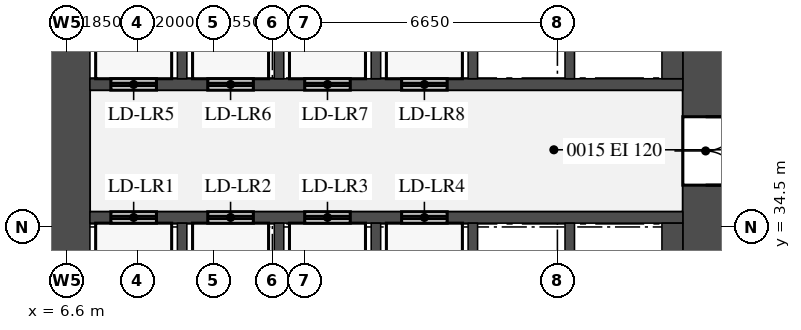
"""IFC4 building model, lengths in metres.
Left out: names, types, materials, properties, quantities, classifications, styles, units other than length and angle.
Written with IfcOpenShell. Run it as: python <this file> out.ifc"""

import sys

from ifc_helpers import new_model, si_unit, direction, frame, frame_2d, origin, place, context, subcontext, project, spatial, rectangle, extrude, source, transform, mapped, element, fill, save


model = new_model("IFC4")
c1 = context("Model", 3, precision=1e-05, world=origin(), true_north=direction((0.0, 1.0)))
c2 = subcontext(c1, "Body", "Model", "MODEL_VIEW")
j1 = project(units=[si_unit("LENGTHUNIT", "METRE"), si_unit("PLANEANGLEUNIT", "RADIAN")], contexts=[c1])
p1 = place(None, origin())
s1 = spatial("IfcSite", under=j1, at=p1, CompositionType="ELEMENT")
p2 = place(p1, origin())
s2 = spatial("IfcBuilding", under=s1, at=p2, CompositionType="ELEMENT")
p3 = place(p2, frame((0.0, 0.0, 46.5)))
s3 = spatial("IfcBuildingStorey", under=s2, at=p3, CompositionType="ELEMENT", Elevation=46.5)
m1 = source(origin(), c2, "Body", "SweptSolid", [
    extrude(rectangle(XDim=27.6, YDim=1.2, at=frame_2d((13.8, 0.0))), origin(), (0.0, 0.0, 1.0), 4.2),
])
p4 = place(p3, frame((23.4, 13.2, 0.0), z_axis=(0.0, 0.0, 1.0), x_axis=(0.0, 1.0, 0.0)))
e1 = element("IfcWall", 1, at=p4, inside=s3, PredefinedType="SHEAR", context=c2, shape_type="MappedRepresentation", body=[
    mapped(m1, transform((0.0, 0.0, 0.0))),
])
m2 = source(origin(), c2, "Body", "SweptSolid", [
    extrude(rectangle(XDim=1.8, YDim=2.1, at=frame_2d((0.9, 1.05))), frame((0.0, 0.61, 0.0), z_axis=(0.0, -1.0, 0.0), x_axis=(1.0, 0.0, 0.0)), (0.0, 0.0, 1.0), 1.22),
])
p5 = place(p4, frame((22.4, 0.0, 0.0)))
e2 = element("IfcOpeningElement", 2, at=p5, cuts=e1, PredefinedType="OPENING", context=c2, shape_type="MappedRepresentation", body=[
    mapped(m2, transform((0.0, 0.0, 0.0))),
])
m3 = source(origin(), c2, "Body", "SweptSolid", [
    extrude(rectangle(XDim=1.2, YDim=2.1, at=frame_2d((0.6, 1.05))), frame((0.0, 0.61, 0.0), z_axis=(0.0, -1.0, 0.0), x_axis=(1.0, 0.0, 0.0)), (0.0, 0.0, 1.0), 1.22),
])
p6 = place(p4, frame((15.15, 0.0, 0.0)))
e3 = element("IfcOpeningElement", 3, at=p6, cuts=e1, PredefinedType="OPENING", context=c2, shape_type="MappedRepresentation", body=[
    mapped(m3, transform((0.0, 0.0, 0.0))),
])
m4 = source(origin(), c2, "Body", "SweptSolid", [
    extrude(rectangle(XDim=0.9, YDim=2.1, at=frame_2d((0.45, 1.05))), frame((0.0, 0.61, 0.0), z_axis=(0.0, -1.0, 0.0), x_axis=(1.0, 0.0, 0.0)), (0.0, 0.0, 1.0), 1.22),
])
p7 = place(p4, frame((1.15, 0.0, 0.0)))
e4 = element("IfcOpeningElement", 4, at=p7, cuts=e1, PredefinedType="OPENING", context=c2, shape_type="MappedRepresentation", body=[
    mapped(m4, transform((0.0, 0.0, 0.0))),
])
p8 = place(p4, frame((4.35, 0.0, 0.0)))
e5 = element("IfcOpeningElement", 5, at=p8, cuts=e1, PredefinedType="OPENING", context=c2, shape_type="MappedRepresentation", body=[
    mapped(m4, transform((0.0, 0.0, 0.0))),
])
p9 = place(p4, frame((7.6, 0.0, 0.0)))
e6 = element("IfcOpeningElement", 6, at=p9, cuts=e1, PredefinedType="OPENING", context=c2, shape_type="MappedRepresentation", body=[
    mapped(m4, transform((0.0, 0.0, 0.0))),
])
p10 = place(p3, frame((6.6, 13.2, 0.0), z_axis=(0.0, 0.0, 1.0), x_axis=(0.0, 1.0, 0.0)))
e7 = element("IfcWall", 7, at=p10, inside=s3, PredefinedType="SHEAR", context=c2, shape_type="MappedRepresentation", body=[
    mapped(m1, transform((0.0, 0.0, 0.0))),
])
m5 = source(origin(), c2, "Body", "SweptSolid", [
    extrude(rectangle(XDim=15.6, YDim=0.3, at=frame_2d((7.8, 0.0))), origin(), (0.0, 0.0, 1.0), 4.2),
])
p11 = place(p3, frame((7.2, 38.25, 0.0), z_axis=(0.0, 0.0, 1.0), x_axis=(1.0, 0.0, 0.0)))
e8 = element("IfcWall", 8, at=p11, inside=s3, PredefinedType="STANDARD", context=c2, shape_type="MappedRepresentation", body=[
    mapped(m5, transform((0.0, 0.0, 0.0))),
])
m6 = source(origin(), c2, "Body", "SweptSolid", [
    extrude(rectangle(XDim=1.2, YDim=2.1, at=frame_2d((0.6, 1.05))), frame((0.0, 0.16, 0.0), z_axis=(0.0, -1.0, 0.0), x_axis=(1.0, 0.0, 0.0)), (0.0, 0.0, 1.0), 0.32),
])
p12 = place(p11, frame((0.55, 0.0, 0.0)))
e9 = element("IfcOpeningElement", 9, at=p12, cuts=e8, PredefinedType="OPENING", context=c2, shape_type="MappedRepresentation", body=[
    mapped(m6, transform((0.0, 0.0, 0.0))),
])
p13 = place(p11, frame((3.1, 0.0, 0.0)))
e10 = element("IfcOpeningElement", 10, at=p13, cuts=e8, PredefinedType="OPENING", context=c2, shape_type="MappedRepresentation", body=[
    mapped(m6, transform((0.0, 0.0, 0.0))),
])
p14 = place(p11, frame((5.65, 0.0, 0.0)))
e11 = element("IfcOpeningElement", 11, at=p14, cuts=e8, PredefinedType="OPENING", context=c2, shape_type="MappedRepresentation", body=[
    mapped(m6, transform((0.0, 0.0, 0.0))),
])
p15 = place(p11, frame((8.2, 0.0, 0.0)))
e12 = element("IfcOpeningElement", 12, at=p15, cuts=e8, PredefinedType="OPENING", context=c2, shape_type="MappedRepresentation", body=[
    mapped(m6, transform((0.0, 0.0, 0.0))),
])
p16 = place(p3, frame((7.2, 34.75, 0.0), z_axis=(0.0, 0.0, 1.0), x_axis=(1.0, 0.0, 0.0)))
e13 = element("IfcWall", 13, at=p16, inside=s3, PredefinedType="STANDARD", context=c2, shape_type="MappedRepresentation", body=[
    mapped(m5, transform((0.0, 0.0, 0.0))),
])
p17 = place(p16, frame((0.55, 0.0, 0.0)))
e14 = element("IfcOpeningElement", 14, at=p17, cuts=e13, PredefinedType="OPENING", context=c2, shape_type="MappedRepresentation", body=[
    mapped(m6, transform((0.0, 0.0, 0.0))),
])
p18 = place(p16, frame((3.1, 0.0, 0.0)))
e15 = element("IfcOpeningElement", 15, at=p18, cuts=e13, PredefinedType="OPENING", context=c2, shape_type="MappedRepresentation", body=[
    mapped(m6, transform((0.0, 0.0, 0.0))),
])
p19 = place(p16, frame((5.65, 0.0, 0.0)))
e16 = element("IfcOpeningElement", 16, at=p19, cuts=e13, PredefinedType="OPENING", context=c2, shape_type="MappedRepresentation", body=[
    mapped(m6, transform((0.0, 0.0, 0.0))),
])
p20 = place(p16, frame((8.2, 0.0, 0.0)))
e17 = element("IfcOpeningElement", 17, at=p20, cuts=e13, PredefinedType="OPENING", context=c2, shape_type="MappedRepresentation", body=[
    mapped(m6, transform((0.0, 0.0, 0.0))),
])
m7 = source(origin(), c2, "Body", "SweptSolid", [
    extrude(rectangle(XDim=2.4, YDim=0.25, at=frame_2d((1.2, 0.0))), origin(), (0.0, 0.0, 1.0), 4.2),
])
for number, where, z_axis, x_axis in (
    (18, (9.625, 38.4, 0.0), (0.0, 0.0, 1.0), (0.0, 1.0, 0.0)),
    (19, (12.175, 38.4, 0.0), (0.0, 0.0, 1.0), (0.0, 1.0, 0.0)),
    (20, (14.725, 38.4, 0.0), (0.0, 0.0, 1.0), (0.0, 1.0, 0.0)),
    (21, (17.275, 38.4, 0.0), (0.0, 0.0, 1.0), (0.0, 1.0, 0.0)),
    (22, (19.825, 38.4, 0.0), (0.0, 0.0, 1.0), (0.0, 1.0, 0.0)),
):
    element("IfcWall", number, at=place(p3, frame(where, z_axis=z_axis, x_axis=x_axis)), inside=s3, PredefinedType="STANDARD", context=c2, shape_type="MappedRepresentation", body=[
        mapped(m7, transform((0.0, 0.0, 0.0))),
    ])
m8 = source(origin(), c2, "Body", "SweptSolid", [
    extrude(rectangle(XDim=2.4, YDim=0.55, at=frame_2d((1.2, 0.0))), origin(), (0.0, 0.0, 1.0), 4.2),
])
p21 = place(p3, frame((22.525, 38.4, 0.0), z_axis=(0.0, 0.0, 1.0), x_axis=(0.0, 1.0, 0.0)))
e23 = element("IfcWall", 23, at=p21, inside=s3, PredefinedType="STANDARD", context=c2, shape_type="MappedRepresentation", body=[
    mapped(m8, transform((0.0, 0.0, 0.0))),
])
for number, where, z_axis, x_axis in (
    (24, (9.625, 32.2, 0.0), (0.0, 0.0, 1.0), (0.0, 1.0, 0.0)),
    (25, (12.175, 32.2, 0.0), (0.0, 0.0, 1.0), (0.0, 1.0, 0.0)),
    (26, (14.725, 32.2, 0.0), (0.0, 0.0, 1.0), (0.0, 1.0, 0.0)),
    (27, (17.275, 32.2, 0.0), (0.0, 0.0, 1.0), (0.0, 1.0, 0.0)),
    (28, (19.825, 32.2, 0.0), (0.0, 0.0, 1.0), (0.0, 1.0, 0.0)),
):
    element("IfcWall", number, at=place(p3, frame(where, z_axis=z_axis, x_axis=x_axis)), inside=s3, PredefinedType="STANDARD", context=c2, shape_type="MappedRepresentation", body=[
        mapped(m7, transform((0.0, 0.0, 0.0))),
    ])
p22 = place(p3, frame((22.525, 32.2, 0.0), z_axis=(0.0, 0.0, 1.0), x_axis=(0.0, 1.0, 0.0)))
e29 = element("IfcWall", 29, at=p22, inside=s3, PredefinedType="STANDARD", context=c2, shape_type="MappedRepresentation", body=[
    mapped(m8, transform((0.0, 0.0, 0.0))),
])
m9 = source(origin(), c2, "Body", "SweptSolid", [
    extrude(rectangle(XDim=1.8, YDim=2.1, at=frame_2d((0.9, 1.05))), frame((0.0, 0.55, 0.0), z_axis=(0.0, -1.0, 0.0), x_axis=(1.0, 0.0, 0.0)), (0.0, 0.0, 1.0), 1.1),
])
p23 = place(p5, origin())
e30 = element("IfcDoor", 30, at=p23, inside=s3, OperationType="DOUBLE_DOOR_SINGLE_SWING", PredefinedType="DOOR", context=c2, shape_type="MappedRepresentation", body=[
    mapped(m9, transform((0.0, 0.0, 0.0))),
])
fill(e2, e30)
m10 = source(origin(), c2, "Body", "SweptSolid", [
    extrude(rectangle(XDim=1.2, YDim=2.1, at=frame_2d((0.6, 1.05))), frame((0.0, 0.025, 0.0), z_axis=(0.0, -1.0, 0.0), x_axis=(1.0, 0.0, 0.0)), (0.0, 0.0, 1.0), 0.05),
])
p24 = place(p17, origin())
e31 = element("IfcDoor", 31, at=p24, inside=s3, OperationType="DOUBLE_DOOR_SLIDING", PredefinedType="DOOR", context=c2, shape_type="MappedRepresentation", body=[
    mapped(m10, transform((0.0, 0.0, 0.0))),
])
fill(e14, e31)
p25 = place(p18, origin())
e32 = element("IfcDoor", 32, at=p25, inside=s3, OperationType="DOUBLE_DOOR_SLIDING", PredefinedType="DOOR", context=c2, shape_type="MappedRepresentation", body=[
    mapped(m10, transform((0.0, 0.0, 0.0))),
])
fill(e15, e32)
p26 = place(p19, origin())
e33 = element("IfcDoor", 33, at=p26, inside=s3, OperationType="DOUBLE_DOOR_SLIDING", PredefinedType="DOOR", context=c2, shape_type="MappedRepresentation", body=[
    mapped(m10, transform((0.0, 0.0, 0.0))),
])
fill(e16, e33)
p27 = place(p20, origin())
e34 = element("IfcDoor", 34, at=p27, inside=s3, OperationType="DOUBLE_DOOR_SLIDING", PredefinedType="DOOR", context=c2, shape_type="MappedRepresentation", body=[
    mapped(m10, transform((0.0, 0.0, 0.0))),
])
fill(e17, e34)
p28 = place(p12, origin())
e35 = element("IfcDoor", 35, at=p28, inside=s3, OperationType="DOUBLE_DOOR_SLIDING", PredefinedType="DOOR", context=c2, shape_type="MappedRepresentation", body=[
    mapped(m10, transform((0.0, 0.0, 0.0))),
])
fill(e9, e35)
p29 = place(p13, origin())
e36 = element("IfcDoor", 36, at=p29, inside=s3, OperationType="DOUBLE_DOOR_SLIDING", PredefinedType="DOOR", context=c2, shape_type="MappedRepresentation", body=[
    mapped(m10, transform((0.0, 0.0, 0.0))),
])
fill(e10, e36)
p30 = place(p14, origin())
e37 = element("IfcDoor", 37, at=p30, inside=s3, OperationType="DOUBLE_DOOR_SLIDING", PredefinedType="DOOR", context=c2, shape_type="MappedRepresentation", body=[
    mapped(m10, transform((0.0, 0.0, 0.0))),
])
fill(e11, e37)
p31 = place(p15, origin())
e38 = element("IfcDoor", 38, at=p31, inside=s3, OperationType="DOUBLE_DOOR_SLIDING", PredefinedType="DOOR", context=c2, shape_type="MappedRepresentation", body=[
    mapped(m10, transform((0.0, 0.0, 0.0))),
])
fill(e12, e38)
save(model, sys.argv[1])
